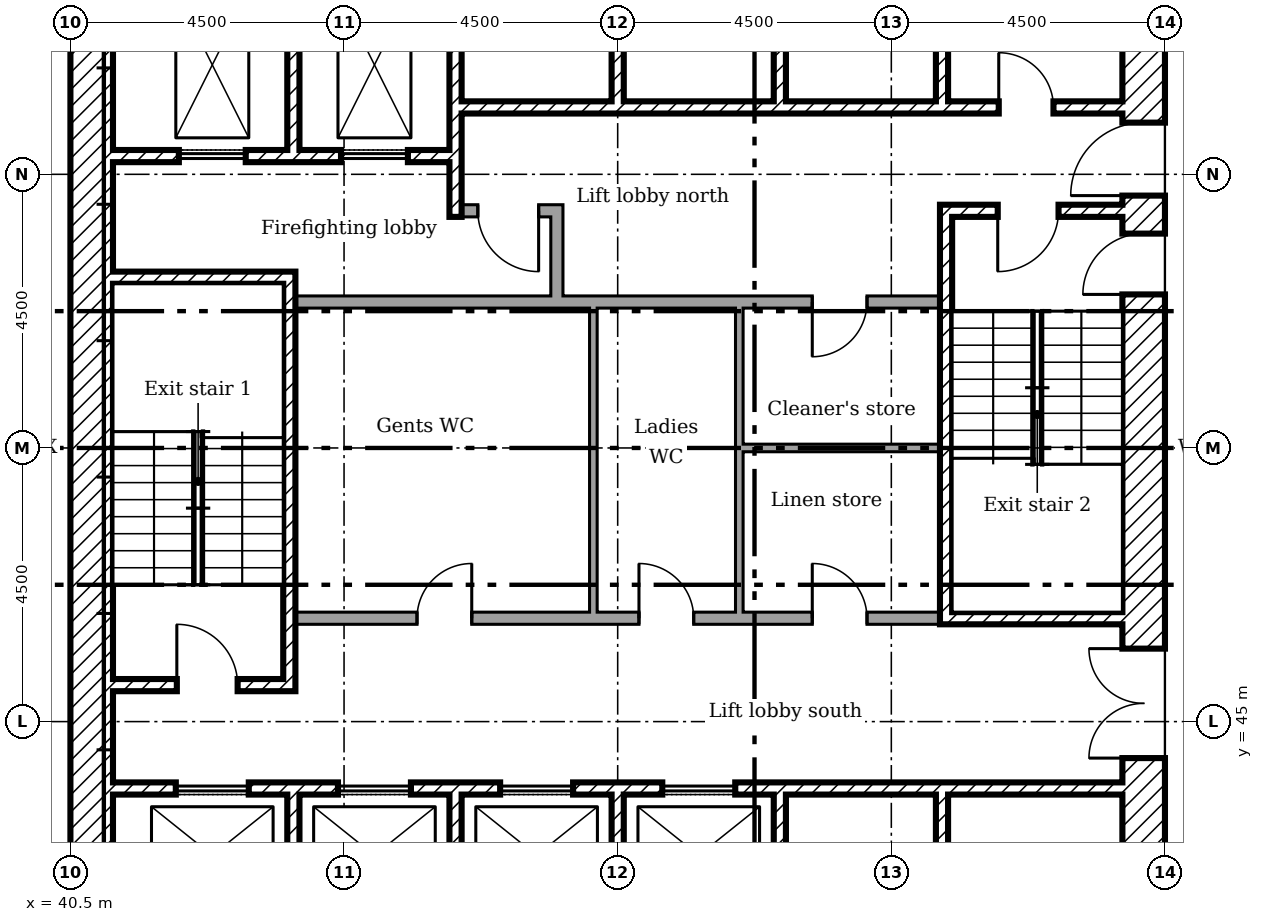
"""IFC4 building model, lengths in metres.
Left out: names, types, materials, properties, quantities, classifications, styles, units other than length and angle.
Written with IfcOpenShell. Run it as: python <this file> out.ifc"""

import sys

from ifc_helpers import new_model, si_unit, direction, frame, frame_2d, origin, place, context, subcontext, project, spatial, rectangle, extrude, element, fill, save


model = new_model("IFC4")
c1 = context("Model", 3, precision=1e-05, world=origin(), true_north=direction((0.0, 1.0)))
c2 = subcontext(c1, "Body", "Model", "MODEL_VIEW")
j1 = project(units=[si_unit("LENGTHUNIT", "METRE"), si_unit("PLANEANGLEUNIT", "RADIAN")], contexts=[c1])
p1 = place(None, origin())
s1 = spatial("IfcSite", under=j1, at=p1, CompositionType="ELEMENT")
p2 = place(p1, origin())
s2 = spatial("IfcBuilding", under=s1, at=p2, CompositionType="ELEMENT")
p3 = place(p2, frame((0.0, 0.0, 135.2)))
s3 = spatial("IfcBuildingStorey", under=s2, at=p3, CompositionType="ELEMENT", Elevation=135.2)
p4 = place(p3, frame((58.15, 40.5, 0.0), z_axis=(0.0, 0.0, 1.0), x_axis=(0.0, 1.0, 0.0)))
e1 = element("IfcWall", 1, at=p4, inside=s3, PredefinedType="SHEAR", context=c2, shape_type="SweptSolid", body=[
    extrude(rectangle(XDim=18.0, YDim=0.7, at=frame_2d((9.0, 0.0))), origin(), (0.0, 0.0, 1.0), 3.3),
])
p5 = place(p4, frame((13.15, 0.0, 0.0)))
e2 = element("IfcOpeningElement", 2, at=p5, cuts=e1, PredefinedType="OPENING", context=c2, shape_type="SweptSolid", body=[
    extrude(rectangle(XDim=1.2, YDim=2.1, at=frame_2d((0.6, 1.05))), frame((0.0, 0.36, 0.0), z_axis=(0.0, -1.0, 0.0), x_axis=(1.0, 0.0, 0.0)), (0.0, 0.0, 1.0), 0.72),
])
p6 = place(p4, frame((3.9, 0.0, 0.0)))
e3 = element("IfcOpeningElement", 3, at=p6, cuts=e1, PredefinedType="OPENING", context=c2, shape_type="SweptSolid", body=[
    extrude(rectangle(XDim=1.8, YDim=2.1, at=frame_2d((0.9, 1.05))), frame((0.0, 0.36, 0.0), z_axis=(0.0, -1.0, 0.0), x_axis=(1.0, 0.0, 0.0)), (0.0, 0.0, 1.0), 0.72),
])
p7 = place(p4, frame((11.525, 0.0, 0.0)))
e4 = element("IfcOpeningElement", 4, at=p7, cuts=e1, PredefinedType="OPENING", context=c2, shape_type="SweptSolid", body=[
    extrude(rectangle(XDim=1.0, YDim=2.1, at=frame_2d((0.5, 1.05))), frame((0.0, 0.36, 0.0), z_axis=(0.0, -1.0, 0.0), x_axis=(1.0, 0.0, 0.0)), (0.0, 0.0, 1.0), 0.72),
])
p8 = place(p3, frame((40.85, 40.5, 0.0), z_axis=(0.0, 0.0, 1.0), x_axis=(0.0, 1.0, 0.0)))
e5 = element("IfcWall", 5, at=p8, inside=s3, PredefinedType="SHEAR", context=c2, shape_type="SweptSolid", body=[
    extrude(rectangle(XDim=18.0, YDim=0.7, at=frame_2d((9.0, 0.0))), origin(), (0.0, 0.0, 1.0), 3.3),
])
p9 = place(p3, frame((44.167, 57.8, 0.0), z_axis=(0.0, 0.0, 1.0), x_axis=(0.0, -1.0, 0.0)))
e6 = element("IfcWall", 6, at=p9, inside=s3, PredefinedType="SHEAR", context=c2, shape_type="SweptSolid", body=[
    extrude(rectangle(XDim=3.4, YDim=0.2, at=frame_2d((1.7, 0.0))), origin(), (0.0, 0.0, 1.0), 3.3),
])
p10 = place(p3, frame((46.833, 57.8, 0.0), z_axis=(0.0, 0.0, 1.0), x_axis=(0.0, -1.0, 0.0)))
e7 = element("IfcWall", 7, at=p10, inside=s3, PredefinedType="SHEAR", context=c2, shape_type="SweptSolid", body=[
    extrude(rectangle(XDim=4.5, YDim=0.2, at=frame_2d((2.25, 0.0))), origin(), (0.0, 0.0, 1.0), 3.3),
])
for number, where, z_axis, x_axis in (
    (8, (49.5, 57.8, 0.0), (0.0, 0.0, 1.0), (0.0, -1.0, 0.0)),
    (9, (52.167, 57.8, 0.0), (0.0, 0.0, 1.0), (0.0, -1.0, 0.0)),
    (10, (54.833, 57.8, 0.0), (0.0, 0.0, 1.0), (0.0, -1.0, 0.0)),
    (11, (44.167, 41.2, 0.0), (0.0, 0.0, 1.0), (0.0, 1.0, 0.0)),
    (12, (46.833, 41.2, 0.0), (0.0, 0.0, 1.0), (0.0, 1.0, 0.0)),
    (13, (49.5, 41.2, 0.0), (0.0, 0.0, 1.0), (0.0, 1.0, 0.0)),
    (14, (52.167, 41.2, 0.0), (0.0, 0.0, 1.0), (0.0, 1.0, 0.0)),
    (15, (54.833, 41.2, 0.0), (0.0, 0.0, 1.0), (0.0, 1.0, 0.0)),
):
    element("IfcWall", number, at=place(p3, frame(where, z_axis=z_axis, x_axis=x_axis)), inside=s3, PredefinedType="SHEAR", context=c2, shape_type="SweptSolid", body=[
        extrude(rectangle(XDim=2.6, YDim=0.2, at=frame_2d((1.3, 0.0))), origin(), (0.0, 0.0, 1.0), 3.3),
    ])
p11 = place(p3, frame((48.5, 51.9, 0.0), z_axis=(0.0, 0.0, 1.0), x_axis=(0.0, 1.0, 0.0)))
e16 = element("IfcWall", 16, at=p11, inside=s3, PredefinedType="PARTITIONING", context=c2, shape_type="SweptSolid", body=[
    extrude(rectangle(XDim=1.6, YDim=0.2, at=frame_2d((0.8, 0.0))), origin(), (0.0, 0.0, 1.0), 3.3),
])
p12 = place(p3, frame((46.933, 53.4, 0.0)))
e17 = element("IfcWall", 17, at=p12, inside=s3, PredefinedType="PARTITIONING", context=c2, shape_type="SweptSolid", body=[
    extrude(rectangle(XDim=1.467, YDim=0.2, at=frame_2d((0.733, 0.0))), origin(), (0.0, 0.0, 1.0), 3.3),
])
p13 = place(p12, frame((0.267, 0.0, 0.0)))
e18 = element("IfcOpeningElement", 18, at=p13, cuts=e17, PredefinedType="OPENING", context=c2, shape_type="SweptSolid", body=[
    extrude(rectangle(XDim=1.0, YDim=2.1, at=frame_2d((0.5, 1.05))), frame((0.0, 0.11, 0.0), z_axis=(0.0, -1.0, 0.0), x_axis=(1.0, 0.0, 0.0)), (0.0, 0.0, 1.0), 0.22),
])
p14 = place(p3, frame((46.933, 55.1, 0.0)))
e19 = element("IfcWall", 19, at=p14, inside=s3, PredefinedType="SHEAR", context=c2, shape_type="SweptSolid", body=[
    extrude(rectangle(XDim=10.867, YDim=0.2, at=frame_2d((5.433, 0.0))), origin(), (0.0, 0.0, 1.0), 3.3),
])
p15 = place(p14, frame((8.833, 0.0, 0.0)))
e20 = element("IfcOpeningElement", 20, at=p15, cuts=e19, PredefinedType="OPENING", context=c2, shape_type="SweptSolid", body=[
    extrude(rectangle(XDim=0.9, YDim=2.1, at=frame_2d((0.45, 1.05))), frame((0.0, 0.11, 0.0), z_axis=(0.0, -1.0, 0.0), x_axis=(1.0, 0.0, 0.0)), (0.0, 0.0, 1.0), 0.22),
])
p16 = place(p3, frame((41.2, 54.3, 0.0)))
e21 = element("IfcWall", 21, at=p16, inside=s3, PredefinedType="SHEAR", context=c2, shape_type="SweptSolid", body=[
    extrude(rectangle(XDim=5.533, YDim=0.2, at=frame_2d((2.767, 0.0))), origin(), (0.0, 0.0, 1.0), 3.3),
])
p17 = place(p16, frame((1.083, 0.0, 0.0)))
e22 = element("IfcOpeningElement", 22, at=p17, cuts=e21, PredefinedType="OPENING", context=c2, shape_type="SweptSolid", body=[
    extrude(rectangle(XDim=1.1, YDim=2.1, at=frame_2d((0.55, 1.05))), frame((0.0, 0.11, 0.0), z_axis=(0.0, -1.0, 0.0), x_axis=(1.0, 0.0, 0.0)), (0.0, 0.0, 1.0), 0.22),
])
p18 = place(p16, frame((3.75, 0.0, 0.0)))
e23 = element("IfcOpeningElement", 23, at=p18, cuts=e21, PredefinedType="OPENING", context=c2, shape_type="SweptSolid", body=[
    extrude(rectangle(XDim=1.1, YDim=2.1, at=frame_2d((0.55, 1.05))), frame((0.0, 0.11, 0.0), z_axis=(0.0, -1.0, 0.0), x_axis=(1.0, 0.0, 0.0)), (0.0, 0.0, 1.0), 0.22),
])
p19 = place(p3, frame((41.2, 43.9, 0.0)))
e24 = element("IfcWall", 24, at=p19, inside=s3, PredefinedType="SHEAR", context=c2, shape_type="SweptSolid", body=[
    extrude(rectangle(XDim=16.6, YDim=0.2, at=frame_2d((8.3, 0.0))), origin(), (0.0, 0.0, 1.0), 3.3),
])
p20 = place(p19, frame((1.033, 0.0, 0.0)))
e25 = element("IfcOpeningElement", 25, at=p20, cuts=e24, PredefinedType="OPENING", context=c2, shape_type="SweptSolid", body=[
    extrude(rectangle(XDim=1.2, YDim=2.1, at=frame_2d((0.6, 1.05))), frame((0.0, 0.11, 0.0), z_axis=(0.0, -1.0, 0.0), x_axis=(1.0, 0.0, 0.0)), (0.0, 0.0, 1.0), 0.22),
])
p21 = place(p19, frame((3.7, 0.0, 0.0)))
e26 = element("IfcOpeningElement", 26, at=p21, cuts=e24, PredefinedType="OPENING", context=c2, shape_type="SweptSolid", body=[
    extrude(rectangle(XDim=1.2, YDim=2.1, at=frame_2d((0.6, 1.05))), frame((0.0, 0.11, 0.0), z_axis=(0.0, -1.0, 0.0), x_axis=(1.0, 0.0, 0.0)), (0.0, 0.0, 1.0), 0.22),
])
p22 = place(p19, frame((6.367, 0.0, 0.0)))
e27 = element("IfcOpeningElement", 27, at=p22, cuts=e24, PredefinedType="OPENING", context=c2, shape_type="SweptSolid", body=[
    extrude(rectangle(XDim=1.2, YDim=2.1, at=frame_2d((0.6, 1.05))), frame((0.0, 0.11, 0.0), z_axis=(0.0, -1.0, 0.0), x_axis=(1.0, 0.0, 0.0)), (0.0, 0.0, 1.0), 0.22),
])
p23 = place(p19, frame((9.033, 0.0, 0.0)))
e28 = element("IfcOpeningElement", 28, at=p23, cuts=e24, PredefinedType="OPENING", context=c2, shape_type="SweptSolid", body=[
    extrude(rectangle(XDim=1.2, YDim=2.1, at=frame_2d((0.6, 1.05))), frame((0.0, 0.11, 0.0), z_axis=(0.0, -1.0, 0.0), x_axis=(1.0, 0.0, 0.0)), (0.0, 0.0, 1.0), 0.22),
])
p24 = place(p3, frame((44.1, 45.5, 0.0), z_axis=(0.0, 0.0, 1.0), x_axis=(0.0, 1.0, 0.0)))
e29 = element("IfcWall", 29, at=p24, inside=s3, PredefinedType="SHEAR", context=c2, shape_type="SweptSolid", body=[
    extrude(rectangle(XDim=6.9, YDim=0.2, at=frame_2d((3.45, 0.0))), origin(), (0.0, 0.0, 1.0), 3.3),
])
p25 = place(p3, frame((41.2, 52.3, 0.0)))
e30 = element("IfcWall", 30, at=p25, inside=s3, PredefinedType="SHEAR", context=c2, shape_type="SweptSolid", body=[
    extrude(rectangle(XDim=2.8, YDim=0.2, at=frame_2d((1.4, 0.0))), origin(), (0.0, 0.0, 1.0), 3.3),
])
p26 = place(p3, frame((41.2, 45.6, 0.0)))
e31 = element("IfcWall", 31, at=p26, inside=s3, PredefinedType="SHEAR", context=c2, shape_type="SweptSolid", body=[
    extrude(rectangle(XDim=2.8, YDim=0.2, at=frame_2d((1.4, 0.0))), origin(), (0.0, 0.0, 1.0), 3.3),
])
p27 = place(p26, frame((1.05, 0.0, 0.0)))
e32 = element("IfcOpeningElement", 32, at=p27, cuts=e31, PredefinedType="OPENING", context=c2, shape_type="SweptSolid", body=[
    extrude(rectangle(XDim=1.0, YDim=2.1, at=frame_2d((0.5, 1.05))), frame((0.0, 0.11, 0.0), z_axis=(0.0, -1.0, 0.0), x_axis=(1.0, 0.0, 0.0)), (0.0, 0.0, 1.0), 0.22),
])
p28 = place(p3, frame((54.8, 53.4, 0.0)))
e33 = element("IfcWall", 33, at=p28, inside=s3, PredefinedType="SHEAR", context=c2, shape_type="SweptSolid", body=[
    extrude(rectangle(XDim=3.0, YDim=0.2, at=frame_2d((1.5, 0.0))), origin(), (0.0, 0.0, 1.0), 3.3),
])
p29 = place(p28, frame((0.95, 0.0, 0.0)))
e34 = element("IfcOpeningElement", 34, at=p29, cuts=e33, PredefinedType="OPENING", context=c2, shape_type="SweptSolid", body=[
    extrude(rectangle(XDim=1.0, YDim=2.1, at=frame_2d((0.5, 1.05))), frame((0.0, 0.11, 0.0), z_axis=(0.0, -1.0, 0.0), x_axis=(1.0, 0.0, 0.0)), (0.0, 0.0, 1.0), 0.22),
])
p30 = place(p3, frame((54.8, 46.7, 0.0)))
e35 = element("IfcWall", 35, at=p30, inside=s3, PredefinedType="SHEAR", context=c2, shape_type="SweptSolid", body=[
    extrude(rectangle(XDim=3.0, YDim=0.2, at=frame_2d((1.5, 0.0))), origin(), (0.0, 0.0, 1.0), 3.3),
])
p31 = place(p3, frame((54.9, 46.8, 0.0), z_axis=(0.0, 0.0, 1.0), x_axis=(0.0, 1.0, 0.0)))
e36 = element("IfcWall", 36, at=p31, inside=s3, PredefinedType="SHEAR", context=c2, shape_type="SweptSolid", body=[
    extrude(rectangle(XDim=6.5, YDim=0.2, at=frame_2d((3.25, 0.0))), origin(), (0.0, 0.0, 1.0), 3.3),
])
p32 = place(p3, frame((44.2, 51.9, 0.0)))
e37 = element("IfcWall", 37, at=p32, inside=s3, PredefinedType="PARTITIONING", context=c2, shape_type="SweptSolid", body=[
    extrude(rectangle(XDim=10.6, YDim=0.2, at=frame_2d((5.3, 0.0))), origin(), (0.0, 0.0, 1.0), 3.3),
])
p33 = place(p32, frame((8.5, 0.0, 0.0)))
e38 = element("IfcOpeningElement", 38, at=p33, cuts=e37, PredefinedType="OPENING", context=c2, shape_type="SweptSolid", body=[
    extrude(rectangle(XDim=0.9, YDim=2.1, at=frame_2d((0.45, 1.05))), frame((0.0, 0.11, 0.0), z_axis=(0.0, -1.0, 0.0), x_axis=(1.0, 0.0, 0.0)), (0.0, 0.0, 1.0), 0.22),
])
p34 = place(p3, frame((44.2, 46.7, 0.0)))
e39 = element("IfcWall", 39, at=p34, inside=s3, PredefinedType="PARTITIONING", context=c2, shape_type="SweptSolid", body=[
    extrude(rectangle(XDim=10.6, YDim=0.2, at=frame_2d((5.3, 0.0))), origin(), (0.0, 0.0, 1.0), 3.3),
])
p35 = place(p34, frame((2.0, 0.0, 0.0)))
e40 = element("IfcOpeningElement", 40, at=p35, cuts=e39, PredefinedType="OPENING", context=c2, shape_type="SweptSolid", body=[
    extrude(rectangle(XDim=0.9, YDim=2.1, at=frame_2d((0.45, 1.05))), frame((0.0, 0.11, 0.0), z_axis=(0.0, -1.0, 0.0), x_axis=(1.0, 0.0, 0.0)), (0.0, 0.0, 1.0), 0.22),
])
p36 = place(p34, frame((5.65, 0.0, 0.0)))
e41 = element("IfcOpeningElement", 41, at=p36, cuts=e39, PredefinedType="OPENING", context=c2, shape_type="SweptSolid", body=[
    extrude(rectangle(XDim=0.9, YDim=2.1, at=frame_2d((0.45, 1.05))), frame((0.0, 0.11, 0.0), z_axis=(0.0, -1.0, 0.0), x_axis=(1.0, 0.0, 0.0)), (0.0, 0.0, 1.0), 0.22),
])
p37 = place(p34, frame((8.5, 0.0, 0.0)))
e42 = element("IfcOpeningElement", 42, at=p37, cuts=e39, PredefinedType="OPENING", context=c2, shape_type="SweptSolid", body=[
    extrude(rectangle(XDim=0.9, YDim=2.1, at=frame_2d((0.45, 1.05))), frame((0.0, 0.11, 0.0), z_axis=(0.0, -1.0, 0.0), x_axis=(1.0, 0.0, 0.0)), (0.0, 0.0, 1.0), 0.22),
])
p38 = place(p3, frame((49.1, 46.8, 0.0), z_axis=(0.0, 0.0, 1.0), x_axis=(0.0, 1.0, 0.0)))
e43 = element("IfcWall", 43, at=p38, inside=s3, PredefinedType="PARTITIONING", context=c2, shape_type="SweptSolid", body=[
    extrude(rectangle(XDim=5.0, YDim=0.125, at=frame_2d((2.5, 0.0))), origin(), (0.0, 0.0, 1.0), 3.3),
])
p39 = place(p3, frame((51.5, 46.8, 0.0), z_axis=(0.0, 0.0, 1.0), x_axis=(0.0, 1.0, 0.0)))
e44 = element("IfcWall", 44, at=p39, inside=s3, PredefinedType="PARTITIONING", context=c2, shape_type="SweptSolid", body=[
    extrude(rectangle(XDim=2.762, YDim=0.125, at=frame_2d((1.381, 0.0))), origin(), (0.0, 0.0, 1.0), 3.3),
])
p40 = place(p3, frame((51.562, 49.5, 0.0)))
e45 = element("IfcWall", 45, at=p40, inside=s3, PredefinedType="PARTITIONING", context=c2, shape_type="SweptSolid", body=[
    extrude(rectangle(XDim=3.238, YDim=0.125, at=frame_2d((1.619, 0.0))), origin(), (0.0, 0.0, 1.0), 3.3),
])
p41 = place(p3, frame((51.5, 49.5, 0.0), z_axis=(0.0, 0.0, 1.0), x_axis=(0.0, 1.0, 0.0)))
e46 = element("IfcWall", 46, at=p41, inside=s3, PredefinedType="PARTITIONING", context=c2, shape_type="SweptSolid", body=[
    extrude(rectangle(XDim=2.3, YDim=0.125, at=frame_2d((1.15, 0.0))), origin(), (0.0, 0.0, 1.0), 3.3),
])
p42 = place(p5, origin())
e47 = element("IfcDoor", 47, at=p42, inside=s3, OperationType="SINGLE_SWING_RIGHT", PredefinedType="DOOR", context=c2, shape_type="SweptSolid", body=[
    extrude(rectangle(XDim=1.2, YDim=2.1, at=frame_2d((0.6, 1.05))), frame((0.0, 0.025, 0.0), z_axis=(0.0, -1.0, 0.0), x_axis=(1.0, 0.0, 0.0)), (0.0, 0.0, 1.0), 0.05),
])
fill(e2, e47)
p43 = place(p6, origin())
e48 = element("IfcDoor", 48, at=p43, inside=s3, OperationType="DOUBLE_DOOR_SINGLE_SWING", PredefinedType="DOOR", context=c2, shape_type="SweptSolid", body=[
    extrude(rectangle(XDim=1.8, YDim=2.1, at=frame_2d((0.9, 1.05))), frame((0.0, 0.025, 0.0), z_axis=(0.0, -1.0, 0.0), x_axis=(1.0, 0.0, 0.0)), (0.0, 0.0, 1.0), 0.05),
])
fill(e3, e48)
p44 = place(p27, origin())
e49 = element("IfcDoor", 49, at=p44, inside=s3, OperationType="SINGLE_SWING_RIGHT", PredefinedType="DOOR", context=c2, shape_type="SweptSolid", body=[
    extrude(rectangle(XDim=1.0, YDim=2.1, at=frame_2d((0.5, 1.05))), frame((0.0, 0.025, 0.0), z_axis=(0.0, -1.0, 0.0), x_axis=(1.0, 0.0, 0.0)), (0.0, 0.0, 1.0), 0.05),
])
fill(e32, e49)
p45 = place(p29, frame((1.0, 0.0, 0.0), x_axis=(-1.0, 0.0, 0.0)))
e50 = element("IfcDoor", 50, at=p45, inside=s3, OperationType="SINGLE_SWING_LEFT", PredefinedType="DOOR", context=c2, shape_type="SweptSolid", body=[
    extrude(rectangle(XDim=1.0, YDim=2.1, at=frame_2d((0.5, 1.05))), frame((0.0, 0.025, 0.0), z_axis=(0.0, -1.0, 0.0), x_axis=(1.0, 0.0, 0.0)), (0.0, 0.0, 1.0), 0.05),
])
fill(e34, e50)
p46 = place(p7, origin())
e51 = element("IfcDoor", 51, at=p46, inside=s3, OperationType="SINGLE_SWING_RIGHT", PredefinedType="DOOR", context=c2, shape_type="SweptSolid", body=[
    extrude(rectangle(XDim=1.0, YDim=2.1, at=frame_2d((0.5, 1.05))), frame((0.0, 0.025, 0.0), z_axis=(0.0, -1.0, 0.0), x_axis=(1.0, 0.0, 0.0)), (0.0, 0.0, 1.0), 0.05),
])
fill(e4, e51)
p47 = place(p13, frame((1.0, 0.0, 0.0), x_axis=(-1.0, 0.0, 0.0)))
e52 = element("IfcDoor", 52, at=p47, inside=s3, OperationType="SINGLE_SWING_RIGHT", PredefinedType="DOOR", context=c2, shape_type="SweptSolid", body=[
    extrude(rectangle(XDim=1.0, YDim=2.1, at=frame_2d((0.5, 1.05))), frame((0.0, 0.025, 0.0), z_axis=(0.0, -1.0, 0.0), x_axis=(1.0, 0.0, 0.0)), (0.0, 0.0, 1.0), 0.05),
])
fill(e18, e52)
p48 = place(p15, origin())
e53 = element("IfcDoor", 53, at=p48, inside=s3, OperationType="SINGLE_SWING_RIGHT", PredefinedType="DOOR", context=c2, shape_type="SweptSolid", body=[
    extrude(rectangle(XDim=0.9, YDim=2.1, at=frame_2d((0.45, 1.05))), frame((0.0, 0.025, 0.0), z_axis=(0.0, -1.0, 0.0), x_axis=(1.0, 0.0, 0.0)), (0.0, 0.0, 1.0), 0.05),
])
fill(e20, e53)
p49 = place(p35, origin())
e54 = element("IfcDoor", 54, at=p49, inside=s3, OperationType="SINGLE_SWING_LEFT", PredefinedType="DOOR", context=c2, shape_type="SweptSolid", body=[
    extrude(rectangle(XDim=0.9, YDim=2.1, at=frame_2d((0.45, 1.05))), frame((0.0, 0.025, 0.0), z_axis=(0.0, -1.0, 0.0), x_axis=(1.0, 0.0, 0.0)), (0.0, 0.0, 1.0), 0.05),
])
fill(e40, e54)
p50 = place(p36, origin())
e55 = element("IfcDoor", 55, at=p50, inside=s3, OperationType="SINGLE_SWING_RIGHT", PredefinedType="DOOR", context=c2, shape_type="SweptSolid", body=[
    extrude(rectangle(XDim=0.9, YDim=2.1, at=frame_2d((0.45, 1.05))), frame((0.0, 0.025, 0.0), z_axis=(0.0, -1.0, 0.0), x_axis=(1.0, 0.0, 0.0)), (0.0, 0.0, 1.0), 0.05),
])
fill(e41, e55)
p51 = place(p33, frame((0.9, 0.0, 0.0), x_axis=(-1.0, 0.0, 0.0)))
e56 = element("IfcDoor", 56, at=p51, inside=s3, OperationType="SINGLE_SWING_LEFT", PredefinedType="DOOR", context=c2, shape_type="SweptSolid", body=[
    extrude(rectangle(XDim=0.9, YDim=2.1, at=frame_2d((0.45, 1.05))), frame((0.0, 0.025, 0.0), z_axis=(0.0, -1.0, 0.0), x_axis=(1.0, 0.0, 0.0)), (0.0, 0.0, 1.0), 0.05),
])
fill(e38, e56)
p52 = place(p37, origin())
e57 = element("IfcDoor", 57, at=p52, inside=s3, OperationType="SINGLE_SWING_RIGHT", PredefinedType="DOOR", context=c2, shape_type="SweptSolid", body=[
    extrude(rectangle(XDim=0.9, YDim=2.1, at=frame_2d((0.45, 1.05))), frame((0.0, 0.025, 0.0), z_axis=(0.0, -1.0, 0.0), x_axis=(1.0, 0.0, 0.0)), (0.0, 0.0, 1.0), 0.05),
])
fill(e42, e57)
p53 = place(p17, origin())
e58 = element("IfcDoor", 58, at=p53, inside=s3, OperationType="SLIDING_TO_LEFT", PredefinedType="DOOR", context=c2, shape_type="SweptSolid", body=[
    extrude(rectangle(XDim=1.1, YDim=2.1, at=frame_2d((0.55, 1.05))), frame((0.0, 0.025, 0.0), z_axis=(0.0, -1.0, 0.0), x_axis=(1.0, 0.0, 0.0)), (0.0, 0.0, 1.0), 0.05),
])
fill(e22, e58)
p54 = place(p18, origin())
e59 = element("IfcDoor", 59, at=p54, inside=s3, OperationType="SLIDING_TO_LEFT", PredefinedType="DOOR", context=c2, shape_type="SweptSolid", body=[
    extrude(rectangle(XDim=1.1, YDim=2.1, at=frame_2d((0.55, 1.05))), frame((0.0, 0.025, 0.0), z_axis=(0.0, -1.0, 0.0), x_axis=(1.0, 0.0, 0.0)), (0.0, 0.0, 1.0), 0.05),
])
fill(e23, e59)
p55 = place(p20, origin())
e60 = element("IfcDoor", 60, at=p55, inside=s3, OperationType="SLIDING_TO_LEFT", PredefinedType="DOOR", context=c2, shape_type="SweptSolid", body=[
    extrude(rectangle(XDim=1.2, YDim=2.1, at=frame_2d((0.6, 1.05))), frame((0.0, 0.025, 0.0), z_axis=(0.0, -1.0, 0.0), x_axis=(1.0, 0.0, 0.0)), (0.0, 0.0, 1.0), 0.05),
])
fill(e25, e60)
p56 = place(p21, origin())
e61 = element("IfcDoor", 61, at=p56, inside=s3, OperationType="SLIDING_TO_LEFT", PredefinedType="DOOR", context=c2, shape_type="SweptSolid", body=[
    extrude(rectangle(XDim=1.2, YDim=2.1, at=frame_2d((0.6, 1.05))), frame((0.0, 0.025, 0.0), z_axis=(0.0, -1.0, 0.0), x_axis=(1.0, 0.0, 0.0)), (0.0, 0.0, 1.0), 0.05),
])
fill(e26, e61)
p57 = place(p22, origin())
e62 = element("IfcDoor", 62, at=p57, inside=s3, OperationType="SLIDING_TO_LEFT", PredefinedType="DOOR", context=c2, shape_type="SweptSolid", body=[
    extrude(rectangle(XDim=1.2, YDim=2.1, at=frame_2d((0.6, 1.05))), frame((0.0, 0.025, 0.0), z_axis=(0.0, -1.0, 0.0), x_axis=(1.0, 0.0, 0.0)), (0.0, 0.0, 1.0), 0.05),
])
fill(e27, e62)
p58 = place(p23, origin())
e63 = element("IfcDoor", 63, at=p58, inside=s3, OperationType="SLIDING_TO_LEFT", PredefinedType="DOOR", context=c2, shape_type="SweptSolid", body=[
    extrude(rectangle(XDim=1.2, YDim=2.1, at=frame_2d((0.6, 1.05))), frame((0.0, 0.025, 0.0), z_axis=(0.0, -1.0, 0.0), x_axis=(1.0, 0.0, 0.0)), (0.0, 0.0, 1.0), 0.05),
])
fill(e28, e63)
save(model, sys.argv[1])
